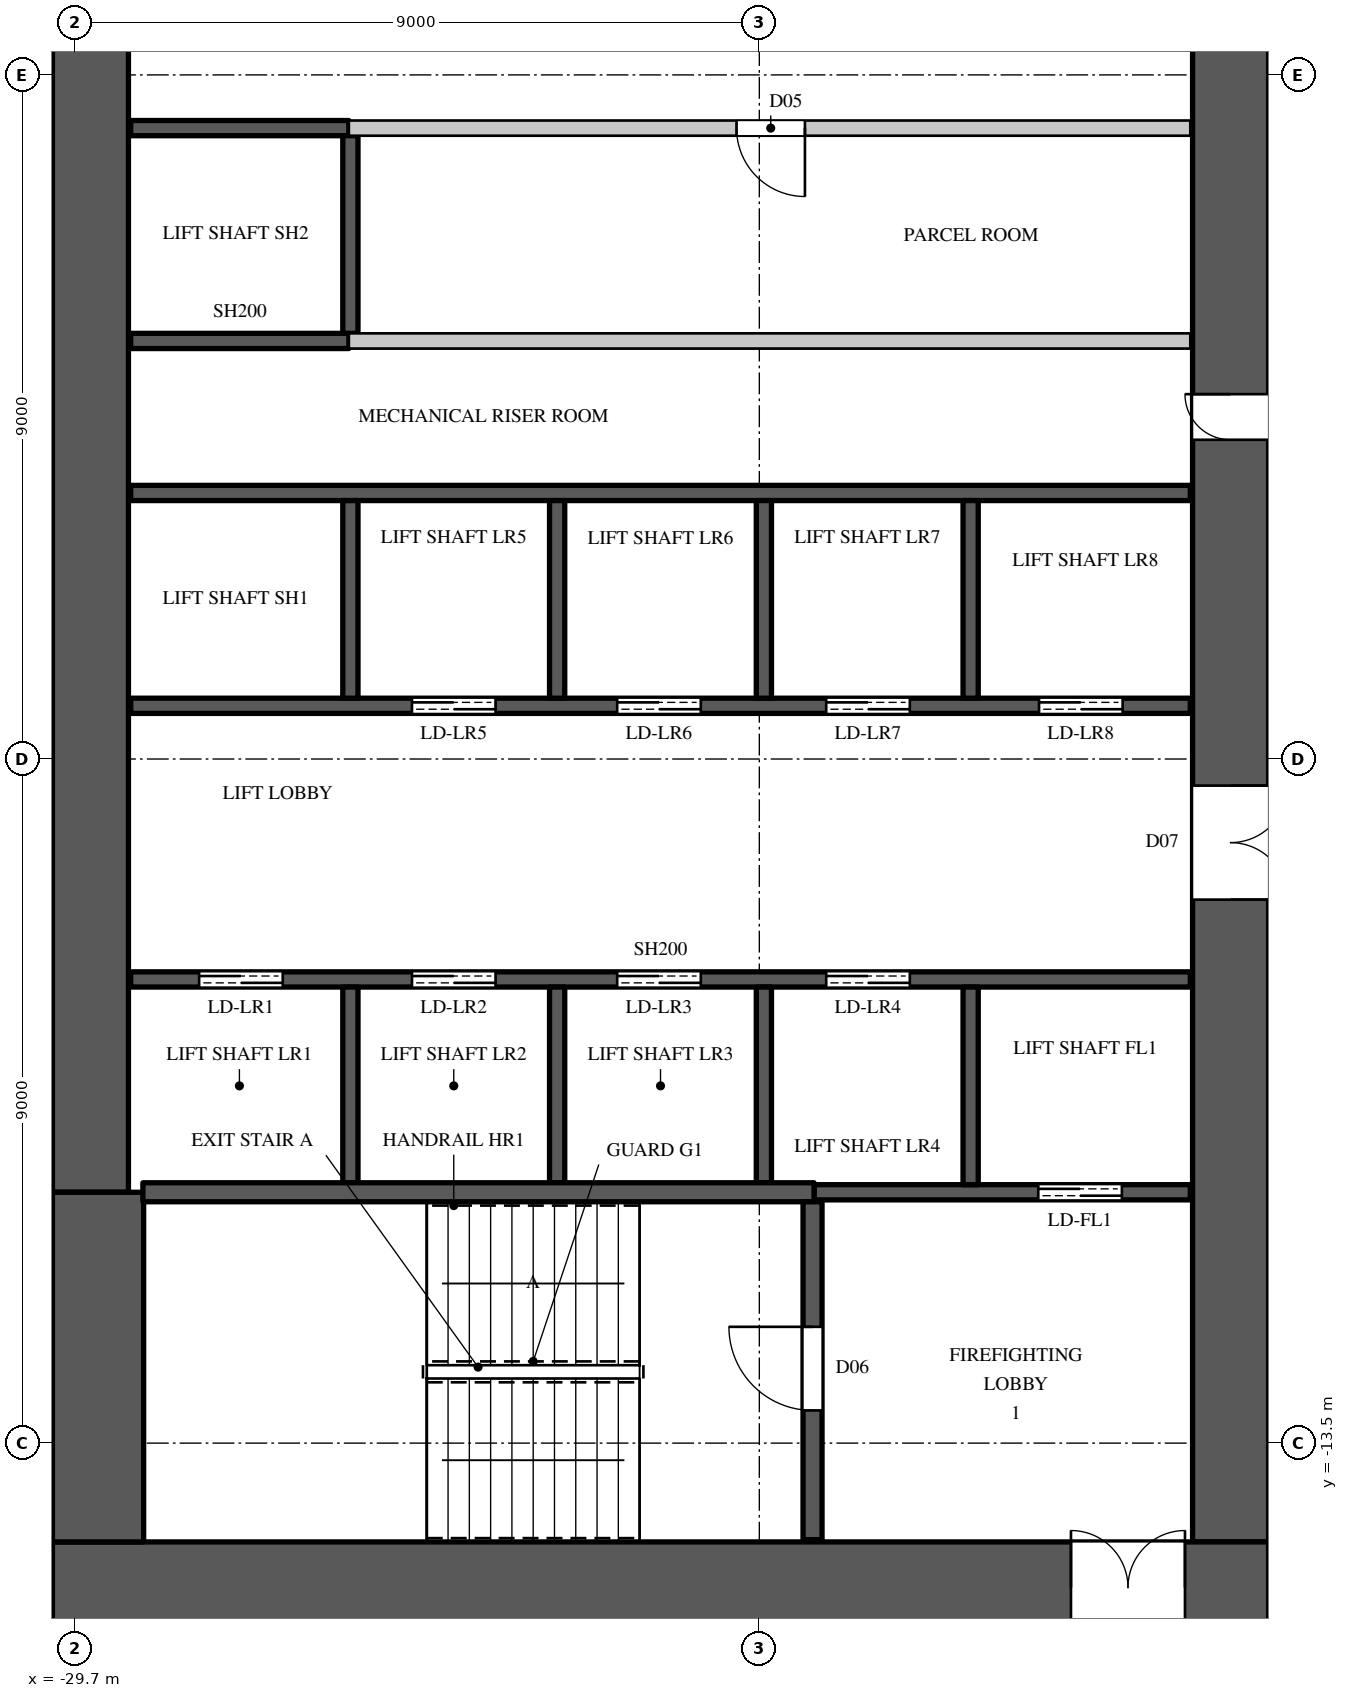
"""IFC4 building model, lengths in metres.
Left out: names, types, materials, properties, quantities, classifications, styles, units other than length and angle.
Written with IfcOpenShell. Run it as: python <this file> out.ifc"""

import sys

from ifc_helpers import new_model, si_unit, direction, frame, frame_2d, origin, place, context, subcontext, project, spatial, rectangle, extrude, element, fill, save


model = new_model("IFC4")
c1 = context("Model", 3, precision=1e-05, world=origin(), true_north=direction((0.0, 1.0)))
c2 = subcontext(c1, "Body", "Model", "MODEL_VIEW")
j1 = project(units=[si_unit("LENGTHUNIT", "METRE"), si_unit("PLANEANGLEUNIT", "RADIAN")], contexts=[c1])
p1 = place(None, origin())
s1 = spatial("IfcSite", under=j1, at=p1, CompositionType="ELEMENT")
p2 = place(p1, origin())
s2 = spatial("IfcBuilding", under=s1, at=p2, CompositionType="ELEMENT")
p3 = place(p2, frame((0.0, 0.0, 113.1)))
s3 = spatial("IfcBuildingStorey", under=s2, at=p3, CompositionType="ELEMENT", Elevation=113.1)
p4 = place(p3, frame((-30.0, -15.4, 0.0), z_axis=(0.0, 0.0, 1.0), x_axis=(1.0, 0.0, 0.0)))
e1 = element("IfcWall", 1, at=p4, inside=s3, PredefinedType="SHEAR", context=c2, shape_type="SweptSolid", body=[
    extrude(rectangle(XDim=16.0, YDim=1.2, at=frame_2d((8.0, 0.0))), origin(), (0.0, 0.0, 1.0), 3.6),
])
p5 = place(p4, frame((13.4, 0.0, 0.0)))
e2 = element("IfcOpeningElement", 2, at=p5, cuts=e1, PredefinedType="OPENING", context=c2, shape_type="SweptSolid", body=[
    extrude(rectangle(XDim=1.5, YDim=2.4, at=frame_2d((0.75, 1.2))), frame((0.0, 0.61, 0.0), z_axis=(0.0, -1.0, 0.0), x_axis=(1.0, 0.0, 0.0)), (0.0, 0.0, 1.0), 1.22),
])
p6 = place(p3, frame((-14.5, -14.8, 0.0), z_axis=(0.0, 0.0, 1.0), x_axis=(0.0, 1.0, 0.0)))
e3 = element("IfcWall", 3, at=p6, inside=s3, PredefinedType="SHEAR", context=c2, shape_type="SweptSolid", body=[
    extrude(rectangle(XDim=29.6, YDim=1.0, at=frame_2d((14.8, 0.0))), origin(), (0.0, 0.0, 1.0), 3.6),
])
p7 = place(p6, frame((8.45, 0.0, 0.0)))
e4 = element("IfcOpeningElement", 4, at=p7, cuts=e3, PredefinedType="OPENING", context=c2, shape_type="SweptSolid", body=[
    extrude(rectangle(XDim=1.5, YDim=2.4, at=frame_2d((0.75, 1.2))), frame((0.0, 0.51, 0.0), z_axis=(0.0, -1.0, 0.0), x_axis=(1.0, 0.0, 0.0)), (0.0, 0.0, 1.0), 1.02),
])
p8 = place(p6, frame((19.65, 0.0, 0.0)))
e5 = element("IfcOpeningElement", 5, at=p8, cuts=e3, PredefinedType="OPENING", context=c2, shape_type="SweptSolid", body=[
    extrude(rectangle(XDim=1.5, YDim=2.4, at=frame_2d((0.75, 1.2))), frame((0.0, 0.51, 0.0), z_axis=(0.0, -1.0, 0.0), x_axis=(1.0, 0.0, 0.0)), (0.0, 0.0, 1.0), 1.02),
])
p9 = place(p6, frame((14.5, 0.0, 0.0)))
e6 = element("IfcOpeningElement", 6, at=p9, cuts=e3, PredefinedType="OPENING", context=c2, shape_type="SweptSolid", body=[
    extrude(rectangle(XDim=0.6, YDim=2.0, at=frame_2d((0.3, 1.0))), frame((0.0, 0.51, 0.0), z_axis=(0.0, -1.0, 0.0), x_axis=(1.0, 0.0, 0.0)), (0.0, 0.0, 1.0), 1.02),
])
p10 = place(p3, frame((-29.5, -10.2, 0.0), z_axis=(0.0, 0.0, 1.0), x_axis=(0.0, 1.0, 0.0)))
e7 = element("IfcWall", 7, at=p10, inside=s3, PredefinedType="SHEAR", context=c2, shape_type="SweptSolid", body=[
    extrude(rectangle(XDim=20.4, YDim=1.0, at=frame_2d((10.2, 0.0))), origin(), (0.0, 0.0, 1.0), 3.6),
])
p11 = place(p3, frame((-29.4, -14.8, 0.0), z_axis=(0.0, 0.0, 1.0), x_axis=(0.0, 1.0, 0.0)))
e8 = element("IfcWall", 8, at=p11, inside=s3, PredefinedType="SHEAR", context=c2, shape_type="SweptSolid", body=[
    extrude(rectangle(XDim=4.6, YDim=1.2, at=frame_2d((2.3, 0.0))), origin(), (0.0, 0.0, 1.0), 3.6),
])
p12 = place(p3, frame((-26.1, 3.8, 0.0), z_axis=(0.0, 0.0, 1.0), x_axis=(1.0, 0.0, 0.0)))
e9 = element("IfcWall", 9, at=p12, inside=s3, PredefinedType="PARTITIONING", context=c2, shape_type="SweptSolid", body=[
    extrude(rectangle(XDim=11.07, YDim=0.2, at=frame_2d((5.535, 0.0))), origin(), (0.0, 0.0, 1.0), 3.3),
])
p13 = place(p12, frame((5.1, 0.0, 0.0)))
e10 = element("IfcOpeningElement", 10, at=p13, cuts=e9, PredefinedType="OPENING", context=c2, shape_type="SweptSolid", body=[
    extrude(rectangle(XDim=0.9, YDim=2.2, at=frame_2d((0.45, 1.1))), frame((0.0, 0.11, 0.0), z_axis=(0.0, -1.0, 0.0), x_axis=(1.0, 0.0, 0.0)), (0.0, 0.0, 1.0), 0.22),
])
p14 = place(p3, frame((-26.1, 1.0, 0.0), z_axis=(0.0, 0.0, 1.0), x_axis=(1.0, 0.0, 0.0)))
e11 = element("IfcWall", 11, at=p14, inside=s3, PredefinedType="PARTITIONING", context=c2, shape_type="SweptSolid", body=[
    extrude(rectangle(XDim=11.07, YDim=0.2, at=frame_2d((5.535, 0.0))), origin(), (0.0, 0.0, 1.0), 3.3),
])
p15 = place(p3, frame((-28.97, -7.4, 0.0), z_axis=(0.0, 0.0, 1.0), x_axis=(1.0, 0.0, 0.0)))
e12 = element("IfcWall", 12, at=p15, inside=s3, PredefinedType="SHEAR", context=c2, shape_type="SweptSolid", body=[
    extrude(rectangle(XDim=13.94, YDim=0.2, at=frame_2d((6.97, 0.0))), origin(), (0.0, 0.0, 1.0), 3.3),
])
p16 = place(p15, frame((0.9, 0.0, 0.0)))
e13 = element("IfcOpeningElement", 13, at=p16, cuts=e12, PredefinedType="OPENING", context=c2, shape_type="SweptSolid", body=[
    extrude(rectangle(XDim=1.1, YDim=2.2, at=frame_2d((0.55, 1.1))), frame((0.0, 0.11, 0.0), z_axis=(0.0, -1.0, 0.0), x_axis=(1.0, 0.0, 0.0)), (0.0, 0.0, 1.0), 0.22),
])
p17 = place(p15, frame((3.7, 0.0, 0.0)))
e14 = element("IfcOpeningElement", 14, at=p17, cuts=e12, PredefinedType="OPENING", context=c2, shape_type="SweptSolid", body=[
    extrude(rectangle(XDim=1.1, YDim=2.2, at=frame_2d((0.55, 1.1))), frame((0.0, 0.11, 0.0), z_axis=(0.0, -1.0, 0.0), x_axis=(1.0, 0.0, 0.0)), (0.0, 0.0, 1.0), 0.22),
])
p18 = place(p15, frame((6.4, 0.0, 0.0)))
e15 = element("IfcOpeningElement", 15, at=p18, cuts=e12, PredefinedType="OPENING", context=c2, shape_type="SweptSolid", body=[
    extrude(rectangle(XDim=1.1, YDim=2.2, at=frame_2d((0.55, 1.1))), frame((0.0, 0.11, 0.0), z_axis=(0.0, -1.0, 0.0), x_axis=(1.0, 0.0, 0.0)), (0.0, 0.0, 1.0), 0.22),
])
p19 = place(p15, frame((9.15, 0.0, 0.0)))
e16 = element("IfcOpeningElement", 16, at=p19, cuts=e12, PredefinedType="OPENING", context=c2, shape_type="SweptSolid", body=[
    extrude(rectangle(XDim=1.1, YDim=2.2, at=frame_2d((0.55, 1.1))), frame((0.0, 0.11, 0.0), z_axis=(0.0, -1.0, 0.0), x_axis=(1.0, 0.0, 0.0)), (0.0, 0.0, 1.0), 0.22),
])
p20 = place(p3, frame((-28.97, -3.8, 0.0), z_axis=(0.0, 0.0, 1.0), x_axis=(1.0, 0.0, 0.0)))
e17 = element("IfcWall", 17, at=p20, inside=s3, PredefinedType="SHEAR", context=c2, shape_type="SweptSolid", body=[
    extrude(rectangle(XDim=13.94, YDim=0.2, at=frame_2d((6.97, 0.0))), origin(), (0.0, 0.0, 1.0), 3.3),
])
p21 = place(p20, frame((3.7, 0.0, 0.0)))
e18 = element("IfcOpeningElement", 18, at=p21, cuts=e17, PredefinedType="OPENING", context=c2, shape_type="SweptSolid", body=[
    extrude(rectangle(XDim=1.1, YDim=2.2, at=frame_2d((0.55, 1.1))), frame((0.0, 0.11, 0.0), z_axis=(0.0, -1.0, 0.0), x_axis=(1.0, 0.0, 0.0)), (0.0, 0.0, 1.0), 0.22),
])
p22 = place(p20, frame((6.4, 0.0, 0.0)))
e19 = element("IfcOpeningElement", 19, at=p22, cuts=e17, PredefinedType="OPENING", context=c2, shape_type="SweptSolid", body=[
    extrude(rectangle(XDim=1.1, YDim=2.2, at=frame_2d((0.55, 1.1))), frame((0.0, 0.11, 0.0), z_axis=(0.0, -1.0, 0.0), x_axis=(1.0, 0.0, 0.0)), (0.0, 0.0, 1.0), 0.22),
])
p23 = place(p20, frame((9.15, 0.0, 0.0)))
e20 = element("IfcOpeningElement", 20, at=p23, cuts=e17, PredefinedType="OPENING", context=c2, shape_type="SweptSolid", body=[
    extrude(rectangle(XDim=1.1, YDim=2.2, at=frame_2d((0.55, 1.1))), frame((0.0, 0.11, 0.0), z_axis=(0.0, -1.0, 0.0), x_axis=(1.0, 0.0, 0.0)), (0.0, 0.0, 1.0), 0.22),
])
p24 = place(p20, frame((11.95, 0.0, 0.0)))
e21 = element("IfcOpeningElement", 21, at=p24, cuts=e17, PredefinedType="OPENING", context=c2, shape_type="SweptSolid", body=[
    extrude(rectangle(XDim=1.1, YDim=2.2, at=frame_2d((0.55, 1.1))), frame((0.0, 0.11, 0.0), z_axis=(0.0, -1.0, 0.0), x_axis=(1.0, 0.0, 0.0)), (0.0, 0.0, 1.0), 0.22),
])
p25 = place(p3, frame((-28.97, -1.0, 0.0), z_axis=(0.0, 0.0, 1.0), x_axis=(1.0, 0.0, 0.0)))
e22 = element("IfcWall", 22, at=p25, inside=s3, PredefinedType="SHEAR", context=c2, shape_type="SweptSolid", body=[
    extrude(rectangle(XDim=13.94, YDim=0.2, at=frame_2d((6.97, 0.0))), origin(), (0.0, 0.0, 1.0), 3.3),
])
for number, where, z_axis, x_axis in (
    (23, (-28.97, 1.0, 0.0), (0.0, 0.0, 1.0), (1.0, 0.0, 0.0)),
    (24, (-28.97, 3.8, 0.0), (0.0, 0.0, 1.0), (1.0, 0.0, 0.0)),
):
    element("IfcWall", number, at=place(p3, frame(where, z_axis=z_axis, x_axis=x_axis)), inside=s3, PredefinedType="SHEAR", context=c2, shape_type="SweptSolid", body=[
        extrude(rectangle(XDim=2.87, YDim=0.2, at=frame_2d((1.435, 0.0))), origin(), (0.0, 0.0, 1.0), 3.3),
    ])
p26 = place(p3, frame((-26.08, -10.075, 0.0), z_axis=(0.0, 0.0, 1.0), x_axis=(0.0, 1.0, 0.0)))
e25 = element("IfcWall", 25, at=p26, inside=s3, PredefinedType="SHEAR", context=c2, shape_type="SweptSolid", body=[
    extrude(rectangle(XDim=2.575, YDim=0.2, at=frame_2d((1.288, 0.0))), origin(), (0.0, 0.0, 1.0), 3.6),
])
p27 = place(p3, frame((-26.08, -3.7, 0.0), z_axis=(0.0, 0.0, 1.0), x_axis=(0.0, 1.0, 0.0)))
e26 = element("IfcWall", 26, at=p27, inside=s3, PredefinedType="SHEAR", context=c2, shape_type="SweptSolid", body=[
    extrude(rectangle(XDim=2.6, YDim=0.2, at=frame_2d((1.3, 0.0))), origin(), (0.0, 0.0, 1.0), 3.6),
])
p28 = place(p3, frame((-26.08, 1.1, 0.0), z_axis=(0.0, 0.0, 1.0), x_axis=(0.0, 1.0, 0.0)))
e27 = element("IfcWall", 27, at=p28, inside=s3, PredefinedType="SHEAR", context=c2, shape_type="SweptSolid", body=[
    extrude(rectangle(XDim=2.6, YDim=0.2, at=frame_2d((1.3, 0.0))), origin(), (0.0, 0.0, 1.0), 3.3),
])
p29 = place(p3, frame((-23.36, -10.075, 0.0), z_axis=(0.0, 0.0, 1.0), x_axis=(0.0, 1.0, 0.0)))
e28 = element("IfcWall", 28, at=p29, inside=s3, PredefinedType="SHEAR", context=c2, shape_type="SweptSolid", body=[
    extrude(rectangle(XDim=2.575, YDim=0.2, at=frame_2d((1.288, 0.0))), origin(), (0.0, 0.0, 1.0), 3.6),
])
p30 = place(p3, frame((-23.36, -3.7, 0.0), z_axis=(0.0, 0.0, 1.0), x_axis=(0.0, 1.0, 0.0)))
e29 = element("IfcWall", 29, at=p30, inside=s3, PredefinedType="SHEAR", context=c2, shape_type="SweptSolid", body=[
    extrude(rectangle(XDim=2.6, YDim=0.2, at=frame_2d((1.3, 0.0))), origin(), (0.0, 0.0, 1.0), 3.6),
])
p31 = place(p3, frame((-20.64, -10.075, 0.0), z_axis=(0.0, 0.0, 1.0), x_axis=(0.0, 1.0, 0.0)))
e30 = element("IfcWall", 30, at=p31, inside=s3, PredefinedType="SHEAR", context=c2, shape_type="SweptSolid", body=[
    extrude(rectangle(XDim=2.575, YDim=0.2, at=frame_2d((1.288, 0.0))), origin(), (0.0, 0.0, 1.0), 3.6),
])
p32 = place(p3, frame((-20.64, -3.7, 0.0), z_axis=(0.0, 0.0, 1.0), x_axis=(0.0, 1.0, 0.0)))
e31 = element("IfcWall", 31, at=p32, inside=s3, PredefinedType="SHEAR", context=c2, shape_type="SweptSolid", body=[
    extrude(rectangle(XDim=2.6, YDim=0.2, at=frame_2d((1.3, 0.0))), origin(), (0.0, 0.0, 1.0), 3.6),
])
p33 = place(p3, frame((-19.98, -10.2, 0.0), z_axis=(0.0, 0.0, 1.0), x_axis=(1.0, 0.0, 0.0)))
e32 = element("IfcWall", 32, at=p33, inside=s3, PredefinedType="SHEAR", context=c2, shape_type="SweptSolid", body=[
    extrude(rectangle(XDim=4.95, YDim=0.2, at=frame_2d((2.475, 0.0))), origin(), (0.0, 0.0, 1.0), 3.3),
])
p34 = place(p33, frame((2.95, 0.0, 0.0)))
e33 = element("IfcOpeningElement", 33, at=p34, cuts=e32, PredefinedType="OPENING", context=c2, shape_type="SweptSolid", body=[
    extrude(rectangle(XDim=1.1, YDim=2.2, at=frame_2d((0.55, 1.1))), frame((0.0, 0.11, 0.0), z_axis=(0.0, -1.0, 0.0), x_axis=(1.0, 0.0, 0.0)), (0.0, 0.0, 1.0), 0.22),
])
p35 = place(p3, frame((-17.92, -10.1, 0.0), z_axis=(0.0, 0.0, 1.0), x_axis=(0.0, 1.0, 0.0)))
e34 = element("IfcWall", 34, at=p35, inside=s3, PredefinedType="SHEAR", context=c2, shape_type="SweptSolid", body=[
    extrude(rectangle(XDim=2.6, YDim=0.2, at=frame_2d((1.3, 0.0))), origin(), (0.0, 0.0, 1.0), 3.6),
])
p36 = place(p3, frame((-17.92, -3.7, 0.0), z_axis=(0.0, 0.0, 1.0), x_axis=(0.0, 1.0, 0.0)))
e35 = element("IfcWall", 35, at=p36, inside=s3, PredefinedType="SHEAR", context=c2, shape_type="SweptSolid", body=[
    extrude(rectangle(XDim=2.6, YDim=0.2, at=frame_2d((1.3, 0.0))), origin(), (0.0, 0.0, 1.0), 3.6),
])
p37 = place(p3, frame((-28.81, -10.2, 0.0), z_axis=(0.0, 0.0, 1.0), x_axis=(1.0, 0.0, 0.0)))
e36 = element("IfcWall", 36, at=p37, inside=s3, PredefinedType="SHEAR", context=c2, shape_type="SweptSolid", body=[
    extrude(rectangle(XDim=8.83, YDim=0.25, at=frame_2d((4.415, 0.0))), origin(), (0.0, 0.0, 1.0), 3.3),
])
p38 = place(p3, frame((-20.0, -14.77, 0.0), z_axis=(0.0, 0.0, 1.0), x_axis=(0.0, 1.0, 0.0)))
e37 = element("IfcWall", 37, at=p38, inside=s3, PredefinedType="SHEAR", context=c2, shape_type="SweptSolid", body=[
    extrude(rectangle(XDim=4.445, YDim=0.25, at=frame_2d((2.223, 0.0))), origin(), (0.0, 0.0, 1.0), 3.3),
])
p39 = place(p38, frame((1.7, 0.0, 0.0)))
e38 = element("IfcOpeningElement", 38, at=p39, cuts=e37, PredefinedType="OPENING", context=c2, shape_type="SweptSolid", body=[
    extrude(rectangle(XDim=1.1, YDim=2.2, at=frame_2d((0.55, 1.1))), frame((0.0, 0.135, 0.0), z_axis=(0.0, -1.0, 0.0), x_axis=(1.0, 0.0, 0.0)), (0.0, 0.0, 1.0), 0.27),
])
p40 = place(p39, origin())
e39 = element("IfcDoor", 39, at=p40, inside=s3, OperationType="SINGLE_SWING_RIGHT", PredefinedType="DOOR", context=c2, shape_type="SweptSolid", body=[
    extrude(rectangle(XDim=1.1, YDim=2.2, at=frame_2d((0.55, 1.1))), frame((0.0, 0.025, 0.0), z_axis=(0.0, -1.0, 0.0), x_axis=(1.0, 0.0, 0.0)), (0.0, 0.0, 1.0), 0.05),
])
fill(e38, e39)
p41 = place(p13, origin())
e40 = element("IfcDoor", 40, at=p41, inside=s3, OperationType="SINGLE_SWING_LEFT", PredefinedType="DOOR", context=c2, shape_type="SweptSolid", body=[
    extrude(rectangle(XDim=0.9, YDim=2.2, at=frame_2d((0.45, 1.1))), frame((0.0, 0.025, 0.0), z_axis=(0.0, -1.0, 0.0), x_axis=(1.0, 0.0, 0.0)), (0.0, 0.0, 1.0), 0.05),
])
fill(e10, e40)
p42 = place(p16, origin())
e41 = element("IfcDoor", 41, at=p42, inside=s3, OperationType="DOUBLE_DOOR_SLIDING", PredefinedType="DOOR", context=c2, shape_type="SweptSolid", body=[
    extrude(rectangle(XDim=1.1, YDim=2.2, at=frame_2d((0.55, 1.1))), frame((0.0, 0.025, 0.0), z_axis=(0.0, -1.0, 0.0), x_axis=(1.0, 0.0, 0.0)), (0.0, 0.0, 1.0), 0.05),
])
fill(e13, e41)
p43 = place(p17, origin())
e42 = element("IfcDoor", 42, at=p43, inside=s3, OperationType="DOUBLE_DOOR_SLIDING", PredefinedType="DOOR", context=c2, shape_type="SweptSolid", body=[
    extrude(rectangle(XDim=1.1, YDim=2.2, at=frame_2d((0.55, 1.1))), frame((0.0, 0.025, 0.0), z_axis=(0.0, -1.0, 0.0), x_axis=(1.0, 0.0, 0.0)), (0.0, 0.0, 1.0), 0.05),
])
fill(e14, e42)
p44 = place(p18, origin())
e43 = element("IfcDoor", 43, at=p44, inside=s3, OperationType="DOUBLE_DOOR_SLIDING", PredefinedType="DOOR", context=c2, shape_type="SweptSolid", body=[
    extrude(rectangle(XDim=1.1, YDim=2.2, at=frame_2d((0.55, 1.1))), frame((0.0, 0.025, 0.0), z_axis=(0.0, -1.0, 0.0), x_axis=(1.0, 0.0, 0.0)), (0.0, 0.0, 1.0), 0.05),
])
fill(e15, e43)
p45 = place(p19, origin())
e44 = element("IfcDoor", 44, at=p45, inside=s3, OperationType="DOUBLE_DOOR_SLIDING", PredefinedType="DOOR", context=c2, shape_type="SweptSolid", body=[
    extrude(rectangle(XDim=1.1, YDim=2.2, at=frame_2d((0.55, 1.1))), frame((0.0, 0.025, 0.0), z_axis=(0.0, -1.0, 0.0), x_axis=(1.0, 0.0, 0.0)), (0.0, 0.0, 1.0), 0.05),
])
fill(e16, e44)
p46 = place(p34, origin())
e45 = element("IfcDoor", 45, at=p46, inside=s3, OperationType="DOUBLE_DOOR_SLIDING", PredefinedType="DOOR", context=c2, shape_type="SweptSolid", body=[
    extrude(rectangle(XDim=1.1, YDim=2.2, at=frame_2d((0.55, 1.1))), frame((0.0, 0.025, 0.0), z_axis=(0.0, -1.0, 0.0), x_axis=(1.0, 0.0, 0.0)), (0.0, 0.0, 1.0), 0.05),
])
fill(e33, e45)
p47 = place(p21, origin())
e46 = element("IfcDoor", 46, at=p47, inside=s3, OperationType="DOUBLE_DOOR_SLIDING", PredefinedType="DOOR", context=c2, shape_type="SweptSolid", body=[
    extrude(rectangle(XDim=1.1, YDim=2.2, at=frame_2d((0.55, 1.1))), frame((0.0, 0.025, 0.0), z_axis=(0.0, -1.0, 0.0), x_axis=(1.0, 0.0, 0.0)), (0.0, 0.0, 1.0), 0.05),
])
fill(e18, e46)
p48 = place(p22, origin())
e47 = element("IfcDoor", 47, at=p48, inside=s3, OperationType="DOUBLE_DOOR_SLIDING", PredefinedType="DOOR", context=c2, shape_type="SweptSolid", body=[
    extrude(rectangle(XDim=1.1, YDim=2.2, at=frame_2d((0.55, 1.1))), frame((0.0, 0.025, 0.0), z_axis=(0.0, -1.0, 0.0), x_axis=(1.0, 0.0, 0.0)), (0.0, 0.0, 1.0), 0.05),
])
fill(e19, e47)
p49 = place(p23, origin())
e48 = element("IfcDoor", 48, at=p49, inside=s3, OperationType="DOUBLE_DOOR_SLIDING", PredefinedType="DOOR", context=c2, shape_type="SweptSolid", body=[
    extrude(rectangle(XDim=1.1, YDim=2.2, at=frame_2d((0.55, 1.1))), frame((0.0, 0.025, 0.0), z_axis=(0.0, -1.0, 0.0), x_axis=(1.0, 0.0, 0.0)), (0.0, 0.0, 1.0), 0.05),
])
fill(e20, e48)
p50 = place(p24, origin())
e49 = element("IfcDoor", 49, at=p50, inside=s3, OperationType="DOUBLE_DOOR_SLIDING", PredefinedType="DOOR", context=c2, shape_type="SweptSolid", body=[
    extrude(rectangle(XDim=1.1, YDim=2.2, at=frame_2d((0.55, 1.1))), frame((0.0, 0.025, 0.0), z_axis=(0.0, -1.0, 0.0), x_axis=(1.0, 0.0, 0.0)), (0.0, 0.0, 1.0), 0.05),
])
fill(e21, e49)
p51 = place(p5, origin())
e50 = element("IfcDoor", 50, at=p51, inside=s3, OperationType="DOUBLE_DOOR_SINGLE_SWING", PredefinedType="DOOR", context=c2, shape_type="SweptSolid", body=[
    extrude(rectangle(XDim=1.5, YDim=2.4, at=frame_2d((0.75, 1.2))), frame((0.0, 0.025, 0.0), z_axis=(0.0, -1.0, 0.0), x_axis=(1.0, 0.0, 0.0)), (0.0, 0.0, 1.0), 0.05),
])
fill(e2, e50)
p52 = place(p7, origin())
e51 = element("IfcDoor", 51, at=p52, inside=s3, OperationType="DOUBLE_DOOR_SINGLE_SWING", PredefinedType="DOOR", context=c2, shape_type="SweptSolid", body=[
    extrude(rectangle(XDim=1.5, YDim=2.4, at=frame_2d((0.75, 1.2))), frame((0.0, -0.445, 0.0), z_axis=(0.0, -1.0, 0.0), x_axis=(1.0, 0.0, 0.0)), (0.0, 0.0, 1.0), 0.05),
])
fill(e4, e51)
p53 = place(p9, origin())
e52 = element("IfcDoor", 52, at=p53, inside=s3, OperationType="SINGLE_SWING_RIGHT", PredefinedType="DOOR", context=c2, shape_type="SweptSolid", body=[
    extrude(rectangle(XDim=0.6, YDim=2.0, at=frame_2d((0.3, 1.0))), frame((0.0, 0.495, 0.0), z_axis=(0.0, -1.0, 0.0), x_axis=(1.0, 0.0, 0.0)), (0.0, 0.0, 1.0), 0.05),
])
fill(e6, e52)
save(model, sys.argv[1])
